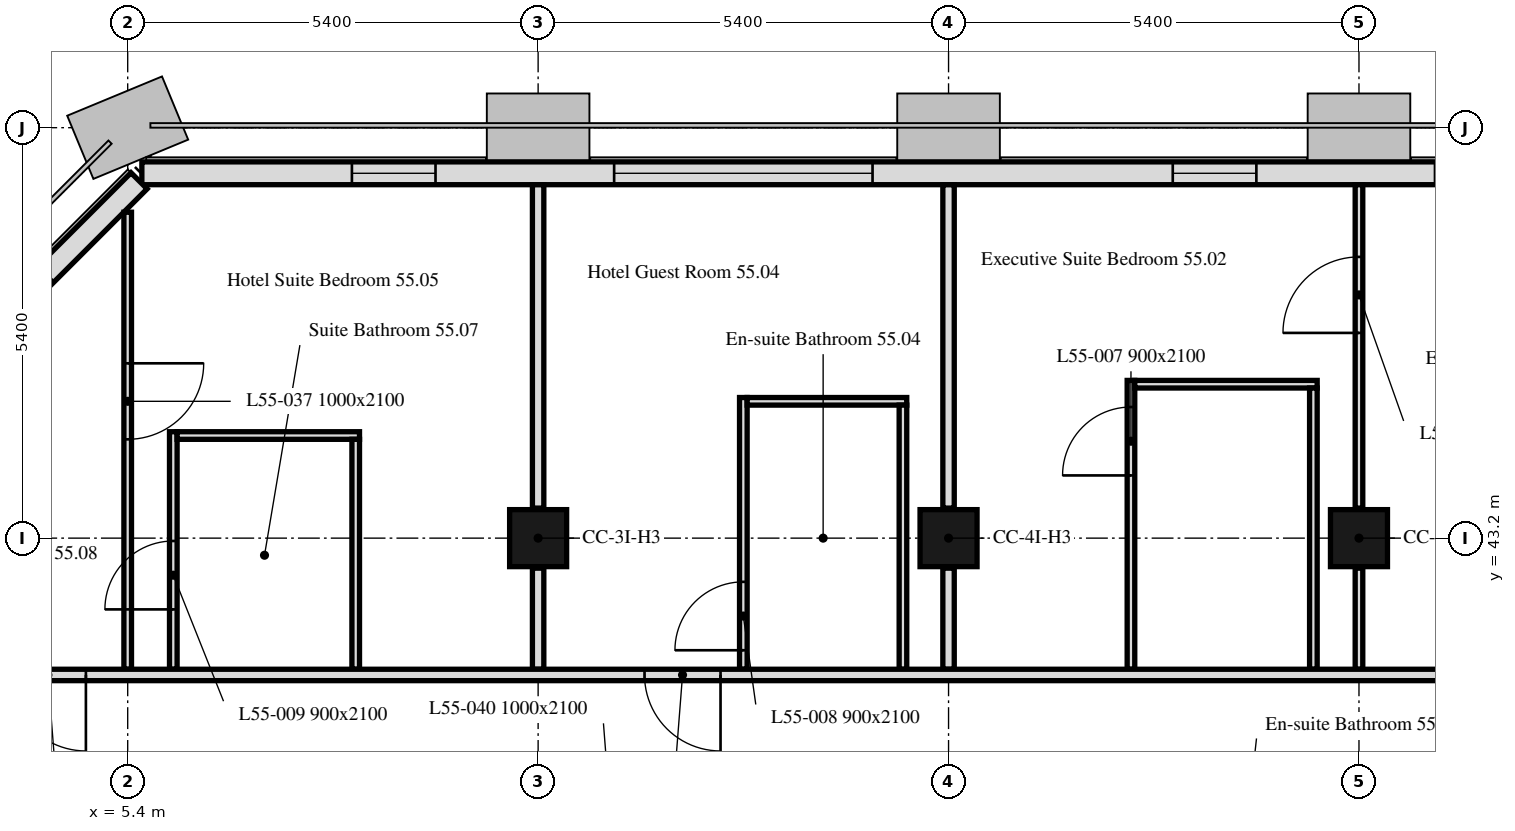
"""IFC4 building model, lengths in metres.
Left out: names, types, materials, properties, quantities, classifications, styles, units other than length and angle.
Written with IfcOpenShell. Run it as: python <this file> out.ifc"""

import sys

from ifc_helpers import new_model, si_unit, direction, frame, frame_2d, origin, origin_2d, place, context, subcontext, project, spatial, rectangle, extrude, element, fill, save


model = new_model("IFC4")
c1 = context("Model", 3, precision=1e-05, world=origin(), true_north=direction((0.0, 1.0)))
c2 = subcontext(c1, "Body", "Model", "MODEL_VIEW")
j1 = project(units=[si_unit("LENGTHUNIT", "METRE"), si_unit("PLANEANGLEUNIT", "RADIAN")], contexts=[c1])
p1 = place(None, origin())
s1 = spatial("IfcSite", under=j1, at=p1, CompositionType="ELEMENT")
p2 = place(p1, origin())
s2 = spatial("IfcBuilding", under=s1, at=p2, CompositionType="ELEMENT")
p3 = place(p2, frame((0.0, 0.0, 220.3)))
s3 = spatial("IfcBuildingStorey", under=s2, at=p3, CompositionType="ELEMENT", Elevation=220.3)
for number, where, z_axis, x_axis in (
    (1, (10.8, 43.2, 0.0), (0.0, 0.0, 1.0), (1.0, 0.0, 0.0)),
    (2, (16.2, 43.2, 0.0), (0.0, 0.0, 1.0), (1.0, 0.0, 0.0)),
    (3, (21.6, 43.2, 0.0), (0.0, 0.0, 1.0), (1.0, 0.0, 0.0)),
):
    element("IfcColumn", number, at=place(p3, frame(where, z_axis=z_axis, x_axis=x_axis)), inside=s3, PredefinedType="COLUMN", context=c2, shape_type="SweptSolid", body=[
        extrude(rectangle(XDim=0.75, YDim=0.75, at=origin_2d()), origin(), (0.0, 0.0, 1.0), 3.0),
    ])
p4 = place(p3, frame((37.614, 48.0, 0.0), z_axis=(0.0, 0.0, 1.0), x_axis=(-1.0, 0.0, 0.0)))
e4 = element("IfcWall", 4, at=p4, inside=s3, PredefinedType="SOLIDWALL", context=c2, shape_type="SweptSolid", body=[
    extrude(rectangle(XDim=32.027, YDim=0.3, at=frame_2d((16.014, 0.0))), origin(), (0.0, 0.0, 1.0), 3.0),
])
p5 = place(p4, frame((0.814, 0.0, 0.9)))
e5 = element("IfcOpeningElement", 5, at=p5, cuts=e4, PredefinedType="OPENING", context=c2, shape_type="SweptSolid", body=[
    extrude(rectangle(XDim=3.4, YDim=1.7, at=frame_2d((1.7, 0.85))), frame((0.0, 0.16, 0.0), z_axis=(0.0, -1.0, 0.0), x_axis=(1.0, 0.0, 0.0)), (0.0, 0.0, 1.0), 0.32),
])
p6 = place(p4, frame((6.564, 0.0, 0.9)))
e6 = element("IfcOpeningElement", 6, at=p6, cuts=e4, PredefinedType="OPENING", context=c2, shape_type="SweptSolid", body=[
    extrude(rectangle(XDim=1.1, YDim=1.7, at=frame_2d((0.55, 0.85))), frame((0.0, 0.16, 0.0), z_axis=(0.0, -1.0, 0.0), x_axis=(1.0, 0.0, 0.0)), (0.0, 0.0, 1.0), 0.32),
])
p7 = place(p4, frame((11.614, 0.0, 0.9)))
e7 = element("IfcOpeningElement", 7, at=p7, cuts=e4, PredefinedType="OPENING", context=c2, shape_type="SweptSolid", body=[
    extrude(rectangle(XDim=3.4, YDim=1.7, at=frame_2d((1.7, 0.85))), frame((0.0, 0.16, 0.0), z_axis=(0.0, -1.0, 0.0), x_axis=(1.0, 0.0, 0.0)), (0.0, 0.0, 1.0), 0.32),
])
p8 = place(p4, frame((17.364, 0.0, 0.9)))
e8 = element("IfcOpeningElement", 8, at=p8, cuts=e4, PredefinedType="OPENING", context=c2, shape_type="SweptSolid", body=[
    extrude(rectangle(XDim=1.1, YDim=1.7, at=frame_2d((0.55, 0.85))), frame((0.0, 0.16, 0.0), z_axis=(0.0, -1.0, 0.0), x_axis=(1.0, 0.0, 0.0)), (0.0, 0.0, 1.0), 0.32),
])
p9 = place(p4, frame((22.414, 0.0, 0.9)))
e9 = element("IfcOpeningElement", 9, at=p9, cuts=e4, PredefinedType="OPENING", context=c2, shape_type="SweptSolid", body=[
    extrude(rectangle(XDim=3.4, YDim=1.7, at=frame_2d((1.7, 0.85))), frame((0.0, 0.16, 0.0), z_axis=(0.0, -1.0, 0.0), x_axis=(1.0, 0.0, 0.0)), (0.0, 0.0, 1.0), 0.32),
])
p10 = place(p4, frame((28.164, 0.0, 0.9)))
e10 = element("IfcOpeningElement", 10, at=p10, cuts=e4, PredefinedType="OPENING", context=c2, shape_type="SweptSolid", body=[
    extrude(rectangle(XDim=1.1, YDim=1.7, at=frame_2d((0.55, 0.85))), frame((0.0, 0.16, 0.0), z_axis=(0.0, -1.0, 0.0), x_axis=(1.0, 0.0, 0.0)), (0.0, 0.0, 1.0), 0.32),
])
p11 = place(p3, frame((5.55, 47.901, 0.0), z_axis=(0.0, 0.0, 1.0), x_axis=(-0.707106781187, -0.707106781187, 0.0)))
e11 = element("IfcWall", 11, at=p11, inside=s3, PredefinedType="SOLIDWALL", context=c2, shape_type="SweptSolid", body=[
    extrude(rectangle(XDim=6.86, YDim=0.3, at=frame_2d((3.43, 0.0))), origin(), (0.0, 0.0, 1.0), 3.0),
])
p12 = place(p11, frame((1.73, 0.0, 0.9)))
e12 = element("IfcOpeningElement", 12, at=p12, cuts=e11, PredefinedType="OPENING", context=c2, shape_type="SweptSolid", body=[
    extrude(rectangle(XDim=3.4, YDim=1.7, at=frame_2d((1.7, 0.85))), frame((0.0, 0.16, 0.0), z_axis=(0.0, -1.0, 0.0), x_axis=(1.0, 0.0, 0.0)), (0.0, 0.0, 1.0), 0.32),
])
p13 = place(p3, frame((16.2, 47.849, 0.0), z_axis=(0.0, 0.0, 1.0), x_axis=(0.0, -1.0, 0.0)))
e13 = element("IfcWall", 13, at=p13, inside=s3, PredefinedType="PARTITIONING", context=c2, shape_type="SweptSolid", body=[
    extrude(rectangle(XDim=4.254, YDim=0.15, at=frame_2d((2.127, 0.0))), origin(), (0.0, 0.0, 1.0), 2.4),
])
p14 = place(p3, frame((16.2, 42.805, 0.0), z_axis=(0.0, 0.0, 1.0), x_axis=(0.0, -1.0, 0.0)))
e14 = element("IfcWall", 14, at=p14, inside=s3, PredefinedType="PARTITIONING", context=c2, shape_type="SweptSolid", body=[
    extrude(rectangle(XDim=1.33, YDim=0.15, at=frame_2d((0.665, 0.0))), origin(), (0.0, 0.0, 1.0), 2.4),
])
p15 = place(p3, frame((18.6, 41.475, 0.0), z_axis=(0.0, 0.0, 1.0), x_axis=(0.0, 1.0, 0.0)))
e15 = element("IfcWall", 15, at=p15, inside=s3, PredefinedType="PARTITIONING", context=c2, shape_type="SweptSolid", body=[
    extrude(rectangle(XDim=3.8, YDim=0.1, at=frame_2d((1.9, 0.0))), origin(), (0.0, 0.0, 1.0), 3.0),
])
p16 = place(p15, frame((2.55, 0.0, 0.0)))
e16 = element("IfcOpeningElement", 16, at=p16, cuts=e15, PredefinedType="OPENING", context=c2, shape_type="SweptSolid", body=[
    extrude(rectangle(XDim=0.9, YDim=2.1, at=frame_2d((0.45, 1.05))), frame((0.0, 0.05, 0.0), z_axis=(0.0, -1.0, 0.0), x_axis=(1.0, 0.0, 0.0)), (0.0, 0.0, 1.0), 0.1),
])
p17 = place(p3, frame((18.65, 45.225, 0.0), z_axis=(0.0, 0.0, 1.0), x_axis=(1.0, 0.0, 0.0)))
e17 = element("IfcWall", 17, at=p17, inside=s3, PredefinedType="PARTITIONING", context=c2, shape_type="SweptSolid", body=[
    extrude(rectangle(XDim=2.4, YDim=0.1, at=frame_2d((1.2, 0.0))), origin(), (0.0, 0.0, 1.0), 3.0),
])
p18 = place(p3, frame((21.0, 45.175, 0.0), z_axis=(0.0, 0.0, 1.0), x_axis=(0.0, -1.0, 0.0)))
e18 = element("IfcWall", 18, at=p18, inside=s3, PredefinedType="PARTITIONING", context=c2, shape_type="SweptSolid", body=[
    extrude(rectangle(XDim=3.7, YDim=0.1, at=frame_2d((1.85, 0.0))), origin(), (0.0, 0.0, 1.0), 3.0),
])
p19 = place(p3, frame((21.6, 41.475, 0.0), z_axis=(0.0, 0.0, 1.0), x_axis=(0.0, 1.0, 0.0)))
e19 = element("IfcWall", 19, at=p19, inside=s3, PredefinedType="PARTITIONING", context=c2, shape_type="SweptSolid", body=[
    extrude(rectangle(XDim=1.33, YDim=0.1, at=frame_2d((0.665, 0.0))), origin(), (0.0, 0.0, 1.0), 2.4),
])
p20 = place(p3, frame((21.6, 43.595, 0.0), z_axis=(0.0, 0.0, 1.0), x_axis=(0.0, 1.0, 0.0)))
e20 = element("IfcWall", 20, at=p20, inside=s3, PredefinedType="PARTITIONING", context=c2, shape_type="SweptSolid", body=[
    extrude(rectangle(XDim=4.254, YDim=0.1, at=frame_2d((2.127, 0.0))), origin(), (0.0, 0.0, 1.0), 2.4),
])
p21 = place(p20, frame((2.305, 0.0, 0.0)))
e21 = element("IfcOpeningElement", 21, at=p21, cuts=e20, PredefinedType="OPENING", context=c2, shape_type="SweptSolid", body=[
    extrude(rectangle(XDim=1.0, YDim=2.1, at=frame_2d((0.5, 1.05))), frame((0.0, 0.05, 0.0), z_axis=(0.0, -1.0, 0.0), x_axis=(1.0, 0.0, 0.0)), (0.0, 0.0, 1.0), 0.1),
])
p22 = place(p3, frame((10.8, 47.849, 0.0), z_axis=(0.0, 0.0, 1.0), x_axis=(0.0, -1.0, 0.0)))
e22 = element("IfcWall", 22, at=p22, inside=s3, PredefinedType="PARTITIONING", context=c2, shape_type="SweptSolid", body=[
    extrude(rectangle(XDim=4.254, YDim=0.15, at=frame_2d((2.127, 0.0))), origin(), (0.0, 0.0, 1.0), 2.4),
])
p23 = place(p3, frame((10.8, 42.805, 0.0), z_axis=(0.0, 0.0, 1.0), x_axis=(0.0, -1.0, 0.0)))
e23 = element("IfcWall", 23, at=p23, inside=s3, PredefinedType="PARTITIONING", context=c2, shape_type="SweptSolid", body=[
    extrude(rectangle(XDim=1.33, YDim=0.15, at=frame_2d((0.665, 0.0))), origin(), (0.0, 0.0, 1.0), 2.4),
])
p24 = place(p3, frame((13.5, 41.475, 0.0), z_axis=(0.0, 0.0, 1.0), x_axis=(0.0, 1.0, 0.0)))
e24 = element("IfcWall", 24, at=p24, inside=s3, PredefinedType="PARTITIONING", context=c2, shape_type="SweptSolid", body=[
    extrude(rectangle(XDim=3.575, YDim=0.1, at=frame_2d((1.788, 0.0))), origin(), (0.0, 0.0, 1.0), 3.0),
])
p25 = place(p24, frame((0.25, 0.0, 0.0)))
e25 = element("IfcOpeningElement", 25, at=p25, cuts=e24, PredefinedType="OPENING", context=c2, shape_type="SweptSolid", body=[
    extrude(rectangle(XDim=0.9, YDim=2.1, at=frame_2d((0.45, 1.05))), frame((0.0, 0.05, 0.0), z_axis=(0.0, -1.0, 0.0), x_axis=(1.0, 0.0, 0.0)), (0.0, 0.0, 1.0), 0.1),
])
p26 = place(p3, frame((13.55, 45.0, 0.0), z_axis=(0.0, 0.0, 1.0), x_axis=(1.0, 0.0, 0.0)))
e26 = element("IfcWall", 26, at=p26, inside=s3, PredefinedType="PARTITIONING", context=c2, shape_type="SweptSolid", body=[
    extrude(rectangle(XDim=2.1, YDim=0.1, at=frame_2d((1.05, 0.0))), origin(), (0.0, 0.0, 1.0), 3.0),
])
p27 = place(p3, frame((15.6, 44.95, 0.0), z_axis=(0.0, 0.0, 1.0), x_axis=(0.0, -1.0, 0.0)))
e27 = element("IfcWall", 27, at=p27, inside=s3, PredefinedType="PARTITIONING", context=c2, shape_type="SweptSolid", body=[
    extrude(rectangle(XDim=3.475, YDim=0.1, at=frame_2d((1.737, 0.0))), origin(), (0.0, 0.0, 1.0), 3.0),
])
p28 = place(p3, frame((5.4, 47.488, 0.0), z_axis=(0.0, 0.0, 1.0), x_axis=(0.0, -1.0, 0.0)))
e28 = element("IfcWall", 28, at=p28, inside=s3, PredefinedType="PARTITIONING", context=c2, shape_type="SweptSolid", body=[
    extrude(rectangle(XDim=6.013, YDim=0.1, at=frame_2d((3.006, 0.0))), origin(), (0.0, 0.0, 1.0), 3.0),
])
p29 = place(p28, frame((1.988, 0.0, 0.0)))
e29 = element("IfcOpeningElement", 29, at=p29, cuts=e28, PredefinedType="OPENING", context=c2, shape_type="SweptSolid", body=[
    extrude(rectangle(XDim=1.0, YDim=2.1, at=frame_2d((0.5, 1.05))), frame((0.0, 0.05, 0.0), z_axis=(0.0, -1.0, 0.0), x_axis=(1.0, 0.0, 0.0)), (0.0, 0.0, 1.0), 0.1),
])
p30 = place(p3, frame((6.0, 41.475, 0.0), z_axis=(0.0, 0.0, 1.0), x_axis=(0.0, 1.0, 0.0)))
e30 = element("IfcWall", 30, at=p30, inside=s3, PredefinedType="PARTITIONING", context=c2, shape_type="SweptSolid", body=[
    extrude(rectangle(XDim=3.125, YDim=0.1, at=frame_2d((1.562, 0.0))), origin(), (0.0, 0.0, 1.0), 3.0),
])
p31 = place(p30, frame((0.788, 0.0, 0.0)))
e31 = element("IfcOpeningElement", 31, at=p31, cuts=e30, PredefinedType="OPENING", context=c2, shape_type="SweptSolid", body=[
    extrude(rectangle(XDim=0.9, YDim=2.1, at=frame_2d((0.45, 1.05))), frame((0.0, 0.05, 0.0), z_axis=(0.0, -1.0, 0.0), x_axis=(1.0, 0.0, 0.0)), (0.0, 0.0, 1.0), 0.1),
])
p32 = place(p3, frame((6.05, 44.55, 0.0), z_axis=(0.0, 0.0, 1.0), x_axis=(1.0, 0.0, 0.0)))
e32 = element("IfcWall", 32, at=p32, inside=s3, PredefinedType="PARTITIONING", context=c2, shape_type="SweptSolid", body=[
    extrude(rectangle(XDim=2.4, YDim=0.1, at=frame_2d((1.2, 0.0))), origin(), (0.0, 0.0, 1.0), 3.0),
])
p33 = place(p3, frame((8.4, 44.5, 0.0), z_axis=(0.0, 0.0, 1.0), x_axis=(0.0, -1.0, 0.0)))
e33 = element("IfcWall", 33, at=p33, inside=s3, PredefinedType="PARTITIONING", context=c2, shape_type="SweptSolid", body=[
    extrude(rectangle(XDim=3.025, YDim=0.1, at=frame_2d((1.512, 0.0))), origin(), (0.0, 0.0, 1.0), 3.0),
])
p34 = place(p3, frame((42.449, 41.4, 0.0), z_axis=(0.0, 0.0, 1.0), x_axis=(-1.0, 0.0, 0.0)))
e34 = element("IfcWall", 34, at=p34, inside=s3, PredefinedType="PARTITIONING", context=c2, shape_type="SweptSolid", body=[
    extrude(rectangle(XDim=41.698, YDim=0.15, at=frame_2d((20.849, 0.0))), origin(), (0.0, 0.0, 1.0), 2.4),
])
p35 = place(p34, frame((1.449, 0.0, 0.0)))
e35 = element("IfcOpeningElement", 35, at=p35, cuts=e34, PredefinedType="OPENING", context=c2, shape_type="SweptSolid", body=[
    extrude(rectangle(XDim=1.0, YDim=2.1, at=frame_2d((0.5, 1.05))), frame((0.0, 0.075, 0.0), z_axis=(0.0, -1.0, 0.0), x_axis=(1.0, 0.0, 0.0)), (0.0, 0.0, 1.0), 0.15),
])
p36 = place(p34, frame((29.249, 0.0, 0.0)))
e36 = element("IfcOpeningElement", 36, at=p36, cuts=e34, PredefinedType="OPENING", context=c2, shape_type="SweptSolid", body=[
    extrude(rectangle(XDim=1.0, YDim=2.1, at=frame_2d((0.5, 1.05))), frame((0.0, 0.075, 0.0), z_axis=(0.0, -1.0, 0.0), x_axis=(1.0, 0.0, 0.0)), (0.0, 0.0, 1.0), 0.15),
])
p37 = place(p34, frame((37.599, 0.0, 0.0)))
e37 = element("IfcOpeningElement", 37, at=p37, cuts=e34, PredefinedType="OPENING", context=c2, shape_type="SweptSolid", body=[
    extrude(rectangle(XDim=1.0, YDim=2.1, at=frame_2d((0.5, 1.05))), frame((0.0, 0.075, 0.0), z_axis=(0.0, -1.0, 0.0), x_axis=(1.0, 0.0, 0.0)), (0.0, 0.0, 1.0), 0.15),
])
p38 = place(p34, frame((17.649, 0.0, 0.0)))
e38 = element("IfcOpeningElement", 38, at=p38, cuts=e34, PredefinedType="OPENING", context=c2, shape_type="SweptSolid", body=[
    extrude(rectangle(XDim=1.0, YDim=2.1, at=frame_2d((0.5, 1.05))), frame((0.0, 0.075, 0.0), z_axis=(0.0, -1.0, 0.0), x_axis=(1.0, 0.0, 0.0)), (0.0, 0.0, 1.0), 0.15),
])
p39 = place(p8, origin())
e39 = element("IfcWindow", 39, at=p39, inside=s3, PartitioningType="SINGLE_PANEL", PredefinedType="WINDOW", context=c2, shape_type="SweptSolid", body=[
    extrude(rectangle(XDim=1.1, YDim=1.7, at=frame_2d((0.55, 0.85))), frame((0.0, 0.03, 0.0), z_axis=(0.0, -1.0, 0.0), x_axis=(1.0, 0.0, 0.0)), (0.0, 0.0, 1.0), 0.06),
])
fill(e8, e39)
p40 = place(p9, origin())
e40 = element("IfcWindow", 40, at=p40, inside=s3, PartitioningType="SINGLE_PANEL", PredefinedType="WINDOW", context=c2, shape_type="SweptSolid", body=[
    extrude(rectangle(XDim=3.4, YDim=1.7, at=frame_2d((1.7, 0.85))), frame((0.0, 0.03, 0.0), z_axis=(0.0, -1.0, 0.0), x_axis=(1.0, 0.0, 0.0)), (0.0, 0.0, 1.0), 0.06),
])
fill(e9, e40)
p41 = place(p10, origin())
e41 = element("IfcWindow", 41, at=p41, inside=s3, PartitioningType="SINGLE_PANEL", PredefinedType="WINDOW", context=c2, shape_type="SweptSolid", body=[
    extrude(rectangle(XDim=1.1, YDim=1.7, at=frame_2d((0.55, 0.85))), frame((0.0, 0.03, 0.0), z_axis=(0.0, -1.0, 0.0), x_axis=(1.0, 0.0, 0.0)), (0.0, 0.0, 1.0), 0.06),
])
fill(e10, e41)
p42 = place(p16, origin())
e42 = element("IfcDoor", 42, at=p42, inside=s3, OperationType="SINGLE_SWING_RIGHT", PredefinedType="DOOR", context=c2, shape_type="SweptSolid", body=[
    extrude(rectangle(XDim=0.9, YDim=2.1, at=frame_2d((0.45, 1.05))), frame((0.0, 0.025, 0.0), z_axis=(0.0, -1.0, 0.0), x_axis=(1.0, 0.0, 0.0)), (0.0, 0.0, 1.0), 0.05),
])
fill(e16, e42)
p43 = place(p25, origin())
e43 = element("IfcDoor", 43, at=p43, inside=s3, OperationType="SINGLE_SWING_RIGHT", PredefinedType="DOOR", context=c2, shape_type="SweptSolid", body=[
    extrude(rectangle(XDim=0.9, YDim=2.1, at=frame_2d((0.45, 1.05))), frame((0.0, 0.025, 0.0), z_axis=(0.0, -1.0, 0.0), x_axis=(1.0, 0.0, 0.0)), (0.0, 0.0, 1.0), 0.05),
])
fill(e25, e43)
p44 = place(p31, origin())
e44 = element("IfcDoor", 44, at=p44, inside=s3, OperationType="SINGLE_SWING_RIGHT", PredefinedType="DOOR", context=c2, shape_type="SweptSolid", body=[
    extrude(rectangle(XDim=0.9, YDim=2.1, at=frame_2d((0.45, 1.05))), frame((0.0, 0.025, 0.0), z_axis=(0.0, -1.0, 0.0), x_axis=(1.0, 0.0, 0.0)), (0.0, 0.0, 1.0), 0.05),
])
fill(e31, e44)
p45 = place(p21, origin())
e45 = element("IfcDoor", 45, at=p45, inside=s3, OperationType="SINGLE_SWING_LEFT", PredefinedType="DOOR", context=c2, shape_type="SweptSolid", body=[
    extrude(rectangle(XDim=1.0, YDim=2.1, at=frame_2d((0.5, 1.05))), frame((0.0, 0.025, 0.0), z_axis=(0.0, -1.0, 0.0), x_axis=(1.0, 0.0, 0.0)), (0.0, 0.0, 1.0), 0.05),
])
fill(e21, e45)
p46 = place(p36, origin())
e46 = element("IfcDoor", 46, at=p46, inside=s3, OperationType="SINGLE_SWING_RIGHT", PredefinedType="DOOR", context=c2, shape_type="SweptSolid", body=[
    extrude(rectangle(XDim=1.0, YDim=2.1, at=frame_2d((0.5, 1.05))), frame((0.0, 0.025, 0.0), z_axis=(0.0, -1.0, 0.0), x_axis=(1.0, 0.0, 0.0)), (0.0, 0.0, 1.0), 0.05),
])
fill(e36, e46)
p47 = place(p29, origin())
e47 = element("IfcDoor", 47, at=p47, inside=s3, OperationType="SINGLE_SWING_RIGHT", PredefinedType="DOOR", context=c2, shape_type="SweptSolid", body=[
    extrude(rectangle(XDim=1.0, YDim=2.1, at=frame_2d((0.5, 1.05))), frame((0.0, 0.025, 0.0), z_axis=(0.0, -1.0, 0.0), x_axis=(1.0, 0.0, 0.0)), (0.0, 0.0, 1.0), 0.05),
])
fill(e29, e47)
p48 = place(p37, origin())
e48 = element("IfcDoor", 48, at=p48, inside=s3, OperationType="SINGLE_SWING_RIGHT", PredefinedType="DOOR", context=c2, shape_type="SweptSolid", body=[
    extrude(rectangle(XDim=1.0, YDim=2.1, at=frame_2d((0.5, 1.05))), frame((0.0, 0.025, 0.0), z_axis=(0.0, -1.0, 0.0), x_axis=(1.0, 0.0, 0.0)), (0.0, 0.0, 1.0), 0.05),
])
fill(e37, e48)
save(model, sys.argv[1])
